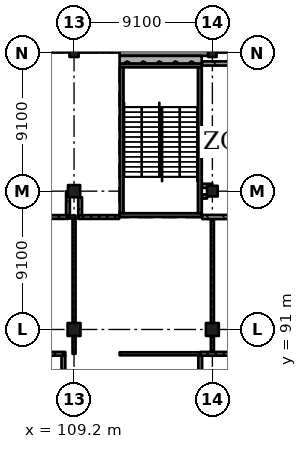
"""IFC4 building model, lengths in metres.
Left out: names, types, materials, properties, quantities, classifications, styles, units other than length and angle.
Written with IfcOpenShell. Run it as: python <this file> out.ifc"""

import sys

from ifc_helpers import new_model, si_unit, direction, frame, frame_2d, origin, origin_2d, place, context, subcontext, project, spatial, rectangle, extrude, element, fill, save


model = new_model("IFC4")
c1 = context("Model", 3, precision=1e-05, world=origin(), true_north=direction((0.0, 1.0)))
c2 = subcontext(c1, "Body", "Model", "MODEL_VIEW")
j1 = project(units=[si_unit("LENGTHUNIT", "METRE"), si_unit("PLANEANGLEUNIT", "RADIAN")], contexts=[c1])
p1 = place(None, origin())
s1 = spatial("IfcSite", under=j1, at=p1, CompositionType="ELEMENT")
p2 = place(p1, origin())
s2 = spatial("IfcBuilding", under=s1, at=p2, CompositionType="ELEMENT")
p3 = place(p2, frame((0.0, 0.0, 6.37)))
s3 = spatial("IfcBuildingStorey", under=s2, at=p3, CompositionType="ELEMENT", Elevation=6.37)
p4 = place(p3, frame((109.2, 91.0, 0.0), z_axis=(0.0, 0.0, 1.0), x_axis=(1.0, 0.0, 0.0)))
e1 = element("IfcColumn", 1, at=p4, inside=s3, PredefinedType="COLUMN", context=c2, shape_type="SweptSolid", body=[
    extrude(rectangle(XDim=0.85, YDim=0.85, at=origin_2d()), origin(), (0.0, 0.0, 1.0), 4.55),
])
p5 = place(p3, frame((109.2, 100.1, 0.0), z_axis=(0.0, 0.0, 1.0), x_axis=(1.0, 0.0, 0.0)))
e2 = element("IfcColumn", 2, at=p5, inside=s3, PredefinedType="COLUMN", context=c2, shape_type="SweptSolid", body=[
    extrude(rectangle(XDim=0.8, YDim=0.8, at=origin_2d()), origin(), (0.0, 0.0, 1.0), 4.55),
])
p6 = place(p3, frame((109.2, 109.225, 0.0), z_axis=(0.0, 0.0, 1.0), x_axis=(1.0, 0.0, 0.0)))
e3 = element("IfcColumn", 3, at=p6, inside=s3, PredefinedType="COLUMN", context=c2, shape_type="SweptSolid", body=[
    extrude(rectangle(XDim=0.6, YDim=0.6, at=origin_2d()), origin(), (0.0, 0.0, 1.0), 4.55),
])
p7 = place(p3, frame((118.3, 91.0, 0.0), z_axis=(0.0, 0.0, 1.0), x_axis=(1.0, 0.0, 0.0)))
e4 = element("IfcColumn", 4, at=p7, inside=s3, PredefinedType="COLUMN", context=c2, shape_type="SweptSolid", body=[
    extrude(rectangle(XDim=0.85, YDim=0.85, at=origin_2d()), origin(), (0.0, 0.0, 1.0), 4.55),
])
p8 = place(p3, frame((118.3, 100.1, 0.0), z_axis=(0.0, 0.0, 1.0), x_axis=(1.0, 0.0, 0.0)))
e5 = element("IfcColumn", 5, at=p8, inside=s3, PredefinedType="COLUMN", context=c2, shape_type="SweptSolid", body=[
    extrude(rectangle(XDim=0.7, YDim=0.7, at=origin_2d()), origin(), (0.0, 0.0, 1.0), 4.55),
])
p9 = place(p3, frame((118.3, 109.2, 0.0), z_axis=(0.0, 0.0, 1.0), x_axis=(1.0, 0.0, 0.0)))
e6 = element("IfcColumn", 6, at=p9, inside=s3, PredefinedType="COLUMN", context=c2, shape_type="SweptSolid", body=[
    extrude(rectangle(XDim=0.55, YDim=0.55, at=origin_2d()), origin(), (0.0, 0.0, 1.0), 4.55),
])
p10 = place(p3, frame((117.6, 98.525, 0.0), z_axis=(0.0, 0.0, 1.0), x_axis=(-1.0, 0.0, 0.0)))
e7 = element("IfcWall", 7, at=p10, inside=s3, PredefinedType="SHEAR", context=c2, shape_type="SweptSolid", body=[
    extrude(rectangle(XDim=5.4, YDim=0.25, at=frame_2d((2.7, 0.0))), origin(), (0.0, 0.0, 1.0), 4.55),
])
p11 = place(p10, frame((1.5, 0.0, 0.0)))
e8 = element("IfcOpeningElement", 8, at=p11, cuts=e7, PredefinedType="OPENING", context=c2, shape_type="SweptSolid", body=[
    extrude(rectangle(XDim=2.4, YDim=2.1, at=frame_2d((1.2, 1.05))), frame((0.0, 0.135, 0.0), z_axis=(0.0, -1.0, 0.0), x_axis=(1.0, 0.0, 0.0)), (0.0, 0.0, 1.0), 0.27),
])
p12 = place(p3, frame((117.6, 108.375, 0.0), z_axis=(0.0, 0.0, 1.0), x_axis=(-1.0, 0.0, 0.0)))
e9 = element("IfcWall", 9, at=p12, inside=s3, PredefinedType="SHEAR", context=c2, shape_type="SweptSolid", body=[
    extrude(rectangle(XDim=5.4, YDim=0.25, at=frame_2d((2.7, 0.0))), origin(), (0.0, 0.0, 1.0), 4.55),
])
for number, where, z_axis, x_axis in (
    (10, (112.325, 108.25, 0.0), (0.0, 0.0, 1.0), (0.0, -1.0, 0.0)),
    (11, (117.475, 108.25, 0.0), (0.0, 0.0, 1.0), (0.0, -1.0, 0.0)),
):
    element("IfcWall", number, at=place(p3, frame(where, z_axis=z_axis, x_axis=x_axis)), inside=s3, PredefinedType="SHEAR", context=c2, shape_type="SweptSolid", body=[
        extrude(rectangle(XDim=9.6, YDim=0.25, at=frame_2d((4.8, 0.0))), origin(), (0.0, 0.0, 1.0), 4.55),
    ])
p13 = place(p3, frame((118.025, 109.175, 0.0), z_axis=(0.0, 0.0, 1.0), x_axis=(-1.0, 0.0, 0.0)))
e12 = element("IfcWall", 12, at=p13, inside=s3, PredefinedType="SOLIDWALL", context=c2, shape_type="SweptSolid", body=[
    extrude(rectangle(XDim=5.825, YDim=0.35, at=frame_2d((2.913, 0.0))), origin(), (0.0, 0.0, 1.0), 3.5),
])
p14 = place(p3, frame((112.2, 108.75, 0.0), z_axis=(0.0, 0.0, 1.0), x_axis=(1.0, 0.0, 0.0)))
e13 = element("IfcWall", 13, at=p14, inside=s3, PredefinedType="SOLIDWALL", context=c2, shape_type="SweptSolid", body=[
    extrude(rectangle(XDim=5.4, YDim=0.5, at=frame_2d((2.7, 0.0))), origin(), (0.0, 0.0, 1.0), 4.55),
])
p15 = place(p3, frame((104.775, 98.4, 0.0), z_axis=(0.0, 0.0, 1.0), x_axis=(1.0, 0.0, 0.0)))
e14 = element("IfcWall", 14, at=p15, inside=s3, PredefinedType="SOLIDWALL", context=c2, shape_type="SweptSolid", body=[
    extrude(rectangle(XDim=4.025, YDim=0.25, at=frame_2d((2.013, 0.0))), origin(), (0.0, 0.0, 1.0), 4.25),
])
p16 = place(p15, frame((1.15, 0.0, 0.0)))
e15 = element("IfcOpeningElement", 15, at=p16, cuts=e14, PredefinedType="OPENING", context=c2, shape_type="SweptSolid", body=[
    extrude(rectangle(XDim=1.8, YDim=2.1, at=frame_2d((0.9, 1.05))), frame((0.0, 0.135, 0.0), z_axis=(0.0, -1.0, 0.0), x_axis=(1.0, 0.0, 0.0)), (0.0, 0.0, 1.0), 0.27),
])
p17 = place(p3, frame((108.5, 82.3, 0.0), z_axis=(0.0, 0.0, 1.0), x_axis=(0.0, 1.0, 0.0)))
e16 = element("IfcWall", 16, at=p17, inside=s3, PredefinedType="SOLIDWALL", context=c2, shape_type="SweptSolid", body=[
    extrude(rectangle(XDim=6.975, YDim=0.25, at=frame_2d((3.487, 0.0))), origin(), (0.0, 0.0, 1.0), 4.25),
])
p18 = place(p3, frame((108.625, 89.4, 0.0), z_axis=(0.0, 0.0, 1.0), x_axis=(-1.0, 0.0, 0.0)))
e17 = element("IfcWall", 17, at=p18, inside=s3, PredefinedType="SOLIDWALL", context=c2, shape_type="SweptSolid", body=[
    extrude(rectangle(XDim=3.575, YDim=0.25, at=frame_2d((1.788, 0.0))), origin(), (0.0, 0.0, 1.0), 4.25),
])
p19 = place(p18, frame((1.25, 0.0, 0.0)))
e18 = element("IfcOpeningElement", 18, at=p19, cuts=e17, PredefinedType="OPENING", context=c2, shape_type="SweptSolid", body=[
    extrude(rectangle(XDim=1.0, YDim=2.1, at=frame_2d((0.5, 1.05))), frame((0.0, 0.135, 0.0), z_axis=(0.0, -1.0, 0.0), x_axis=(1.0, 0.0, 0.0)), (0.0, 0.0, 1.0), 0.27),
])
p20 = place(p3, frame((108.8, 98.525, 0.0), z_axis=(0.0, 0.0, 1.0), x_axis=(0.0, 1.0, 0.0)))
e19 = element("IfcWall", 19, at=p20, inside=s3, PredefinedType="SOLIDWALL", context=c2, shape_type="SweptSolid", body=[
    extrude(rectangle(XDim=1.575, YDim=0.25, at=frame_2d((0.788, 0.0))), origin(), (0.0, 0.0, 1.0), 4.25),
])
p21 = place(p3, frame((109.2, 89.4, 0.0), z_axis=(0.0, 0.0, 1.0), x_axis=(0.0, 1.0, 0.0)))
e20 = element("IfcWall", 20, at=p21, inside=s3, PredefinedType="PARTITIONING", context=c2, shape_type="SweptSolid", body=[
    extrude(rectangle(XDim=1.175, YDim=0.2, at=frame_2d((0.587, 0.0))), origin(), (0.0, 0.0, 1.0), 3.55),
])
p22 = place(p3, frame((109.2, 91.425, 0.0), z_axis=(0.0, 0.0, 1.0), x_axis=(0.0, 1.0, 0.0)))
e21 = element("IfcWall", 21, at=p22, inside=s3, PredefinedType="PARTITIONING", context=c2, shape_type="SweptSolid", body=[
    extrude(rectangle(XDim=6.875, YDim=0.2, at=frame_2d((3.438, 0.0))), origin(), (0.0, 0.0, 1.0), 3.55),
])
p23 = place(p22, frame((0.85, 0.0, 0.0)))
e22 = element("IfcOpeningElement", 22, at=p23, cuts=e21, PredefinedType="OPENING", context=c2, shape_type="SweptSolid", body=[
    extrude(rectangle(XDim=1.8, YDim=2.4, at=frame_2d((0.9, 1.2))), frame((0.0, 0.11, 0.0), z_axis=(0.0, -1.0, 0.0), x_axis=(1.0, 0.0, 0.0)), (0.0, 0.0, 1.0), 0.22),
])
p24 = place(p22, frame((4.25, 0.0, 0.0)))
e23 = element("IfcOpeningElement", 23, at=p24, cuts=e21, PredefinedType="OPENING", context=c2, shape_type="SweptSolid", body=[
    extrude(rectangle(XDim=1.8, YDim=2.4, at=frame_2d((0.9, 1.2))), frame((0.0, 0.11, 0.0), z_axis=(0.0, -1.0, 0.0), x_axis=(1.0, 0.0, 0.0)), (0.0, 0.0, 1.0), 0.22),
])
p25 = place(p3, frame((109.3, 98.4, 0.0), z_axis=(0.0, 0.0, 1.0), x_axis=(-1.0, 0.0, 0.0)))
e24 = element("IfcWall", 24, at=p25, inside=s3, PredefinedType="PARTITIONING", context=c2, shape_type="SweptSolid", body=[
    extrude(rectangle(XDim=0.5, YDim=0.2, at=frame_2d((0.25, 0.0))), origin(), (0.0, 0.0, 1.0), 4.25),
])
p26 = place(p3, frame((109.475, 98.4, 0.0), z_axis=(0.0, 0.0, 1.0), x_axis=(1.0, 0.0, 0.0)))
e25 = element("IfcWall", 25, at=p26, inside=s3, PredefinedType="SOLIDWALL", context=c2, shape_type="SweptSolid", body=[
    extrude(rectangle(XDim=2.695, YDim=0.25, at=frame_2d((1.347, 0.0))), origin(), (0.0, 0.0, 1.0), 4.25),
])
p27 = place(p3, frame((109.6, 99.7, 0.0), z_axis=(0.0, 0.0, 1.0), x_axis=(0.0, -1.0, 0.0)))
e26 = element("IfcWall", 26, at=p27, inside=s3, PredefinedType="SOLIDWALL", context=c2, shape_type="SweptSolid", body=[
    extrude(rectangle(XDim=1.175, YDim=0.25, at=frame_2d((0.587, 0.0))), origin(), (0.0, 0.0, 1.0), 4.25),
])
p28 = place(p3, frame((117.5, 86.43, 0.0), z_axis=(0.0, 0.0, 1.0), x_axis=(0.0, 1.0, 0.0)))
e27 = element("IfcWall", 27, at=p28, inside=s3, PredefinedType="SOLIDWALL", context=c2, shape_type="SweptSolid", body=[
    extrude(rectangle(XDim=2.845, YDim=0.25, at=frame_2d((1.422, 0.0))), origin(), (0.0, 0.0, 1.0), 4.25),
])
p29 = place(p3, frame((117.5, 89.4, 0.0), z_axis=(0.0, 0.0, 1.0), x_axis=(-1.0, 0.0, 0.0)))
e28 = element("IfcWall", 28, at=p29, inside=s3, PredefinedType="PARTITIONING", context=c2, shape_type="SweptSolid", body=[
    extrude(rectangle(XDim=5.3, YDim=0.2, at=frame_2d((2.65, 0.0))), origin(), (0.0, 0.0, 1.0), 4.25),
])
p30 = place(p29, frame((1.75, 0.0, 0.0)))
e29 = element("IfcOpeningElement", 29, at=p30, cuts=e28, PredefinedType="OPENING", context=c2, shape_type="SweptSolid", body=[
    extrude(rectangle(XDim=1.8, YDim=2.4, at=frame_2d((0.9, 1.2))), frame((0.0, 0.11, 0.0), z_axis=(0.0, -1.0, 0.0), x_axis=(1.0, 0.0, 0.0)), (0.0, 0.0, 1.0), 0.22),
])
p31 = place(p3, frame((117.63, 98.4, 0.0), z_axis=(0.0, 0.0, 1.0), x_axis=(1.0, 0.0, 0.0)))
e30 = element("IfcWall", 30, at=p31, inside=s3, PredefinedType="SOLIDWALL", context=c2, shape_type="SweptSolid", body=[
    extrude(rectangle(XDim=3.64, YDim=0.275, at=frame_2d((1.82, 0.0))), origin(), (0.0, 0.0, 1.0), 4.25),
])
p32 = place(p31, frame((1.52, 0.0, 0.0)))
e31 = element("IfcOpeningElement", 31, at=p32, cuts=e30, PredefinedType="OPENING", context=c2, shape_type="SweptSolid", body=[
    extrude(rectangle(XDim=1.2, YDim=2.4, at=frame_2d((0.6, 1.2))), frame((0.0, 0.147, 0.0), z_axis=(0.0, -1.0, 0.0), x_axis=(1.0, 0.0, 0.0)), (0.0, 0.0, 1.0), 0.295),
])
p33 = place(p3, frame((117.63, 99.75, 0.0), z_axis=(0.0, 0.0, 1.0), x_axis=(1.0, 0.0, 0.0)))
e32 = element("IfcWall", 32, at=p33, inside=s3, PredefinedType="SOLIDWALL", context=c2, shape_type="SweptSolid", body=[
    extrude(rectangle(XDim=0.32, YDim=0.275, at=frame_2d((0.16, 0.0))), origin(), (0.0, 0.0, 1.0), 4.25),
])
p34 = place(p3, frame((117.63, 100.45, 0.0), z_axis=(0.0, 0.0, 1.0), x_axis=(1.0, 0.0, 0.0)))
e33 = element("IfcWall", 33, at=p34, inside=s3, PredefinedType="SOLIDWALL", context=c2, shape_type="SweptSolid", body=[
    extrude(rectangle(XDim=0.67, YDim=0.275, at=frame_2d((0.335, 0.0))), origin(), (0.0, 0.0, 1.0), 4.25),
])
p35 = place(p3, frame((117.63, 108.5, 0.0), z_axis=(0.0, 0.0, 1.0), x_axis=(1.0, 0.0, 0.0)))
e34 = element("IfcWall", 34, at=p35, inside=s3, PredefinedType="SOLIDWALL", context=c2, shape_type="SweptSolid", body=[
    extrude(rectangle(XDim=3.64, YDim=0.275, at=frame_2d((1.82, 0.0))), origin(), (0.0, 0.0, 1.0), 4.25),
])
p36 = place(p3, frame((117.5, 89.4, 0.0), z_axis=(0.0, 0.0, 1.0), x_axis=(1.0, 0.0, 0.0)))
e35 = element("IfcWall", 35, at=p36, inside=s3, PredefinedType="SOLIDWALL", context=c2, shape_type="SweptSolid", body=[
    extrude(rectangle(XDim=3.8, YDim=0.25, at=frame_2d((1.9, 0.0))), origin(), (0.0, 0.0, 1.0), 4.25),
])
p37 = place(p36, frame((1.85, 0.0, 0.0)))
e36 = element("IfcOpeningElement", 36, at=p37, cuts=e35, PredefinedType="OPENING", context=c2, shape_type="SweptSolid", body=[
    extrude(rectangle(XDim=0.8, YDim=2.1, at=frame_2d((0.4, 1.05))), frame((0.0, 0.135, 0.0), z_axis=(0.0, -1.0, 0.0), x_axis=(1.0, 0.0, 0.0)), (0.0, 0.0, 1.0), 0.27),
])
p38 = place(p3, frame((118.3, 89.525, 0.0), z_axis=(0.0, 0.0, 1.0), x_axis=(0.0, 1.0, 0.0)))
e37 = element("IfcWall", 37, at=p38, inside=s3, PredefinedType="PARTITIONING", context=c2, shape_type="SweptSolid", body=[
    extrude(rectangle(XDim=1.05, YDim=0.2, at=frame_2d((0.525, 0.0))), origin(), (0.0, 0.0, 1.0), 3.55),
])
p39 = place(p3, frame((118.3, 91.425, 0.0), z_axis=(0.0, 0.0, 1.0), x_axis=(0.0, 1.0, 0.0)))
e38 = element("IfcWall", 38, at=p39, inside=s3, PredefinedType="PARTITIONING", context=c2, shape_type="SweptSolid", body=[
    extrude(rectangle(XDim=6.837, YDim=0.2, at=frame_2d((3.419, 0.0))), origin(), (0.0, 0.0, 1.0), 3.55),
])
p40 = place(p39, frame((0.85, 0.0, 0.0)))
e39 = element("IfcOpeningElement", 39, at=p40, cuts=e38, PredefinedType="OPENING", context=c2, shape_type="SweptSolid", body=[
    extrude(rectangle(XDim=1.8, YDim=2.4, at=frame_2d((0.9, 1.2))), frame((0.0, 0.11, 0.0), z_axis=(0.0, -1.0, 0.0), x_axis=(1.0, 0.0, 0.0)), (0.0, 0.0, 1.0), 0.22),
])
p41 = place(p39, frame((4.25, 0.0, 0.0)))
e40 = element("IfcOpeningElement", 40, at=p41, cuts=e38, PredefinedType="OPENING", context=c2, shape_type="SweptSolid", body=[
    extrude(rectangle(XDim=1.8, YDim=2.4, at=frame_2d((0.9, 1.2))), frame((0.0, 0.11, 0.0), z_axis=(0.0, -1.0, 0.0), x_axis=(1.0, 0.0, 0.0)), (0.0, 0.0, 1.0), 0.22),
])
p42 = place(p32, origin())
e41 = element("IfcDoor", 41, at=p42, inside=s3, OperationType="SINGLE_SWING_RIGHT", PredefinedType="DOOR", context=c2, shape_type="SweptSolid", body=[
    extrude(rectangle(XDim=1.2, YDim=2.4, at=frame_2d((0.6, 1.2))), frame((0.0, 0.025, 0.0), z_axis=(0.0, -1.0, 0.0), x_axis=(1.0, 0.0, 0.0)), (0.0, 0.0, 1.0), 0.05),
])
fill(e31, e41)
p43 = place(p40, origin())
e42 = element("IfcDoor", 42, at=p43, inside=s3, OperationType="DOUBLE_DOOR_SINGLE_SWING", PredefinedType="DOOR", context=c2, shape_type="SweptSolid", body=[
    extrude(rectangle(XDim=1.8, YDim=2.4, at=frame_2d((0.9, 1.2))), frame((0.0, 0.025, 0.0), z_axis=(0.0, -1.0, 0.0), x_axis=(1.0, 0.0, 0.0)), (0.0, 0.0, 1.0), 0.05),
])
fill(e39, e42)
p44 = place(p41, origin())
e43 = element("IfcDoor", 43, at=p44, inside=s3, OperationType="DOUBLE_DOOR_SINGLE_SWING", PredefinedType="DOOR", context=c2, shape_type="SweptSolid", body=[
    extrude(rectangle(XDim=1.8, YDim=2.4, at=frame_2d((0.9, 1.2))), frame((0.0, 0.025, 0.0), z_axis=(0.0, -1.0, 0.0), x_axis=(1.0, 0.0, 0.0)), (0.0, 0.0, 1.0), 0.05),
])
fill(e40, e43)
p45 = place(p23, origin())
e44 = element("IfcDoor", 44, at=p45, inside=s3, OperationType="DOUBLE_DOOR_SINGLE_SWING", PredefinedType="DOOR", context=c2, shape_type="SweptSolid", body=[
    extrude(rectangle(XDim=1.8, YDim=2.4, at=frame_2d((0.9, 1.2))), frame((0.0, 0.025, 0.0), z_axis=(0.0, -1.0, 0.0), x_axis=(1.0, 0.0, 0.0)), (0.0, 0.0, 1.0), 0.05),
])
fill(e22, e44)
p46 = place(p24, origin())
e45 = element("IfcDoor", 45, at=p46, inside=s3, OperationType="DOUBLE_DOOR_SINGLE_SWING", PredefinedType="DOOR", context=c2, shape_type="SweptSolid", body=[
    extrude(rectangle(XDim=1.8, YDim=2.4, at=frame_2d((0.9, 1.2))), frame((0.0, 0.025, 0.0), z_axis=(0.0, -1.0, 0.0), x_axis=(1.0, 0.0, 0.0)), (0.0, 0.0, 1.0), 0.05),
])
fill(e23, e45)
p47 = place(p30, origin())
e46 = element("IfcDoor", 46, at=p47, inside=s3, OperationType="DOUBLE_DOOR_SINGLE_SWING", PredefinedType="DOOR", context=c2, shape_type="SweptSolid", body=[
    extrude(rectangle(XDim=1.8, YDim=2.4, at=frame_2d((0.9, 1.2))), frame((0.0, 0.025, 0.0), z_axis=(0.0, -1.0, 0.0), x_axis=(1.0, 0.0, 0.0)), (0.0, 0.0, 1.0), 0.05),
])
fill(e29, e46)
p48 = place(p11, origin())
e47 = element("IfcDoor", 47, at=p48, inside=s3, OperationType="DOUBLE_DOOR_SINGLE_SWING", PredefinedType="DOOR", context=c2, shape_type="SweptSolid", body=[
    extrude(rectangle(XDim=2.4, YDim=2.1, at=frame_2d((1.2, 1.05))), frame((0.0, 0.025, 0.0), z_axis=(0.0, -1.0, 0.0), x_axis=(1.0, 0.0, 0.0)), (0.0, 0.0, 1.0), 0.05),
])
fill(e8, e47)
save(model, sys.argv[1])
